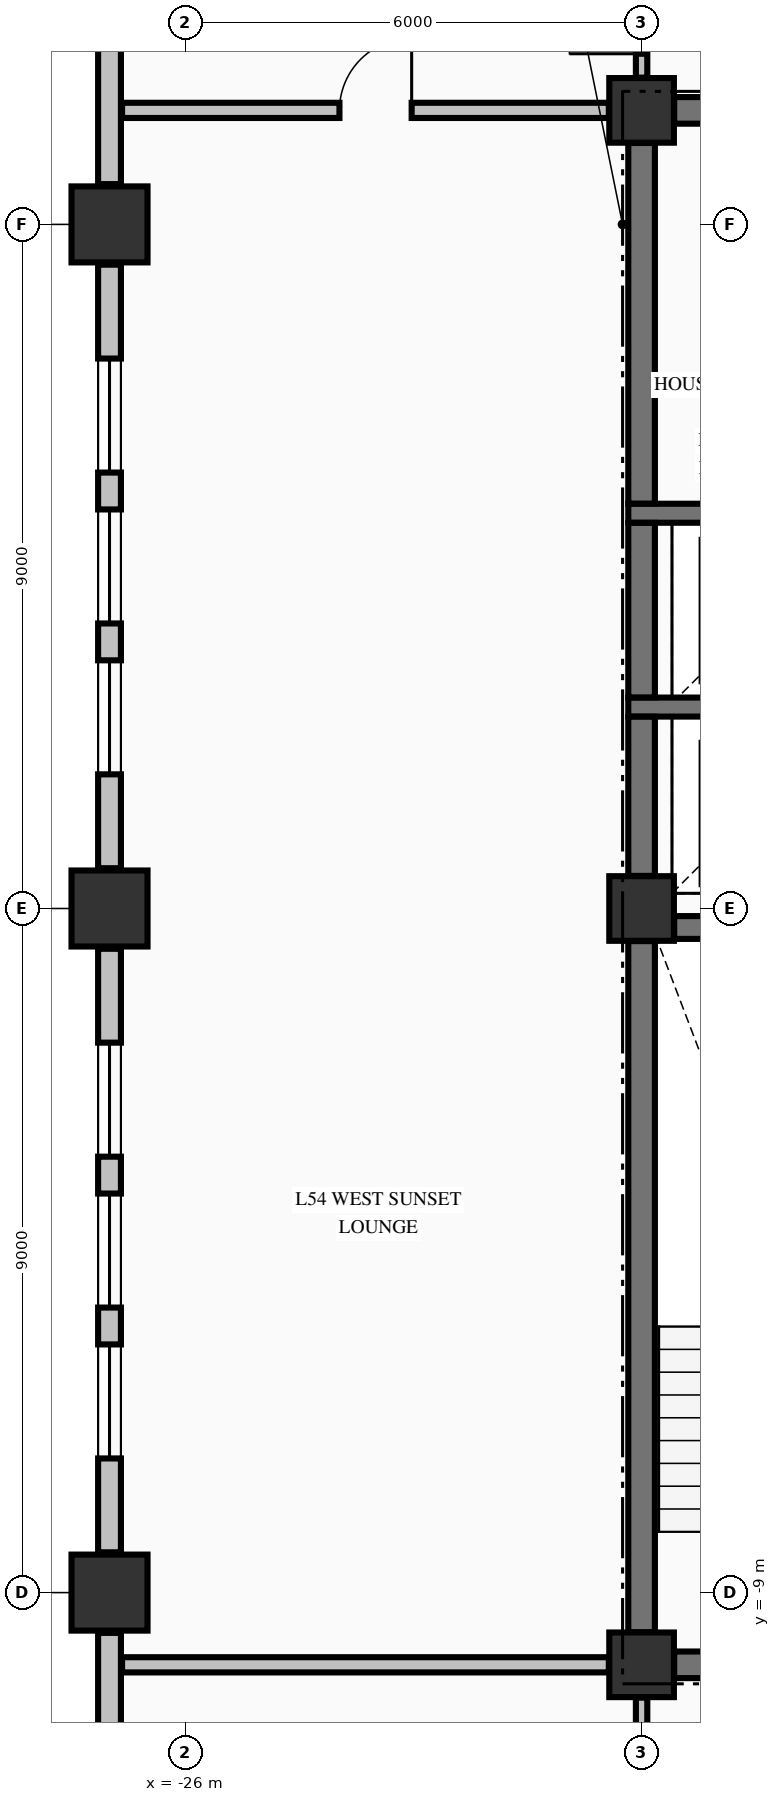
"""IFC4 building model, lengths in metres.
Left out: names, types, materials, properties, quantities, classifications, styles, units other than length and angle.
Written with IfcOpenShell. Run it as: python <this file> out.ifc"""

import sys

from ifc_helpers import new_model, si_unit, direction, frame, frame_2d, origin, origin_2d, place, context, subcontext, project, spatial, rectangle, extrude, element, fill, save


model = new_model("IFC4")
c1 = context("Model", 3, precision=1e-05, world=origin(), true_north=direction((0.0, 1.0)))
c2 = subcontext(c1, "Body", "Model", "MODEL_VIEW")
j1 = project(units=[si_unit("LENGTHUNIT", "METRE"), si_unit("PLANEANGLEUNIT", "RADIAN")], contexts=[c1])
p1 = place(None, origin())
s1 = spatial("IfcSite", under=j1, at=p1, CompositionType="ELEMENT")
p2 = place(p1, origin())
s2 = spatial("IfcBuilding", under=s1, at=p2, CompositionType="ELEMENT")
p3 = place(p2, frame((0.0, 0.0, 208.46)))
s3 = spatial("IfcBuildingStorey", under=s2, at=p3, CompositionType="ELEMENT", Elevation=208.46)
for number, where, z_axis, x_axis in (
    (1, (-27.0, -9.0, -0.25), (0.0, 0.0, 1.0), (1.0, 0.0, 0.0)),
    (2, (-27.0, 0.0, -0.25), (0.0, 0.0, 1.0), (1.0, 0.0, 0.0)),
    (3, (-27.0, 9.0, -0.25), (0.0, 0.0, 1.0), (1.0, 0.0, 0.0)),
):
    element("IfcColumn", number, at=place(p3, frame(where, z_axis=z_axis, x_axis=x_axis)), inside=s3, PredefinedType="COLUMN", context=c2, shape_type="SweptSolid", body=[
        extrude(rectangle(XDim=1.0, YDim=1.0, at=origin_2d()), origin(), (0.0, 0.0, 1.0), 3.325),
    ])
for number, where, z_axis, x_axis in (
    (4, (-20.0, -9.95, -0.25), (0.0, 0.0, 1.0), (1.0, 0.0, 0.0)),
    (5, (-20.0, 10.5, -0.25), (0.0, 0.0, 1.0), (1.0, 0.0, 0.0)),
    (6, (-20.0, 0.0, -0.25), (0.0, 0.0, 1.0), (1.0, 0.0, 0.0)),
):
    element("IfcColumn", number, at=place(p3, frame(where, z_axis=z_axis, x_axis=x_axis)), inside=s3, PredefinedType="COLUMN", context=c2, shape_type="SweptSolid", body=[
        extrude(rectangle(XDim=0.85, YDim=0.85, at=origin_2d()), origin(), (0.0, 0.0, 1.0), 3.325),
    ])
p4 = place(p3, frame((-27.0, -9.53, 0.0), z_axis=(0.0, 0.0, 1.0), x_axis=(0.0, -1.0, 0.0)))
e7 = element("IfcWall", 7, at=p4, inside=s3, PredefinedType="STANDARD", context=c2, shape_type="SweptSolid", body=[
    extrude(rectangle(XDim=9.44, YDim=0.3, at=frame_2d((4.72, 0.0))), origin(), (0.0, 0.0, 1.0), 2.467),
])
p5 = place(p3, frame((-27.0, -0.53, 0.0), z_axis=(0.0, 0.0, 1.0), x_axis=(0.0, -1.0, 0.0)))
e8 = element("IfcWall", 8, at=p5, inside=s3, PredefinedType="STANDARD", context=c2, shape_type="SweptSolid", body=[
    extrude(rectangle(XDim=7.94, YDim=0.3, at=frame_2d((3.97, 0.0))), origin(), (0.0, 0.0, 1.0), 2.467),
])
p6 = place(p5, frame((1.235, 0.0, 0.72)))
e9 = element("IfcOpeningElement", 9, at=p6, cuts=e8, PredefinedType="OPENING", context=c2, shape_type="SweptSolid", body=[
    extrude(rectangle(XDim=1.5, YDim=1.6, at=frame_2d((0.75, 0.8))), frame((0.0, 0.16, 0.0), z_axis=(0.0, -1.0, 0.0), x_axis=(1.0, 0.0, 0.0)), (0.0, 0.0, 1.0), 0.32),
])
p7 = place(p5, frame((3.22, 0.0, 0.72)))
e10 = element("IfcOpeningElement", 10, at=p7, cuts=e8, PredefinedType="OPENING", context=c2, shape_type="SweptSolid", body=[
    extrude(rectangle(XDim=1.5, YDim=1.6, at=frame_2d((0.75, 0.8))), frame((0.0, 0.16, 0.0), z_axis=(0.0, -1.0, 0.0), x_axis=(1.0, 0.0, 0.0)), (0.0, 0.0, 1.0), 0.32),
])
p8 = place(p5, frame((5.205, 0.0, 0.72)))
e11 = element("IfcOpeningElement", 11, at=p8, cuts=e8, PredefinedType="OPENING", context=c2, shape_type="SweptSolid", body=[
    extrude(rectangle(XDim=1.5, YDim=1.6, at=frame_2d((0.75, 0.8))), frame((0.0, 0.16, 0.0), z_axis=(0.0, -1.0, 0.0), x_axis=(1.0, 0.0, 0.0)), (0.0, 0.0, 1.0), 0.32),
])
p9 = place(p3, frame((-27.0, 8.47, 0.0), z_axis=(0.0, 0.0, 1.0), x_axis=(0.0, -1.0, 0.0)))
e12 = element("IfcWall", 12, at=p9, inside=s3, PredefinedType="STANDARD", context=c2, shape_type="SweptSolid", body=[
    extrude(rectangle(XDim=7.94, YDim=0.3, at=frame_2d((3.97, 0.0))), origin(), (0.0, 0.0, 1.0), 2.467),
])
p10 = place(p9, frame((1.235, 0.0, 0.72)))
e13 = element("IfcOpeningElement", 13, at=p10, cuts=e12, PredefinedType="OPENING", context=c2, shape_type="SweptSolid", body=[
    extrude(rectangle(XDim=1.5, YDim=1.6, at=frame_2d((0.75, 0.8))), frame((0.0, 0.16, 0.0), z_axis=(0.0, -1.0, 0.0), x_axis=(1.0, 0.0, 0.0)), (0.0, 0.0, 1.0), 0.32),
])
p11 = place(p9, frame((3.22, 0.0, 0.72)))
e14 = element("IfcOpeningElement", 14, at=p11, cuts=e12, PredefinedType="OPENING", context=c2, shape_type="SweptSolid", body=[
    extrude(rectangle(XDim=1.5, YDim=1.6, at=frame_2d((0.75, 0.8))), frame((0.0, 0.16, 0.0), z_axis=(0.0, -1.0, 0.0), x_axis=(1.0, 0.0, 0.0)), (0.0, 0.0, 1.0), 0.32),
])
p12 = place(p9, frame((5.205, 0.0, 0.72)))
e15 = element("IfcOpeningElement", 15, at=p12, cuts=e12, PredefinedType="OPENING", context=c2, shape_type="SweptSolid", body=[
    extrude(rectangle(XDim=1.5, YDim=1.6, at=frame_2d((0.75, 0.8))), frame((0.0, 0.16, 0.0), z_axis=(0.0, -1.0, 0.0), x_axis=(1.0, 0.0, 0.0)), (0.0, 0.0, 1.0), 0.32),
])
p13 = place(p3, frame((-27.0, 18.97, 0.0), z_axis=(0.0, 0.0, 1.0), x_axis=(0.0, -1.0, 0.0)))
e16 = element("IfcWall", 16, at=p13, inside=s3, PredefinedType="STANDARD", context=c2, shape_type="SweptSolid", body=[
    extrude(rectangle(XDim=9.44, YDim=0.3, at=frame_2d((4.72, 0.0))), origin(), (0.0, 0.0, 1.0), 2.467),
])
p14 = place(p3, frame((-19.571, -9.95, 0.0), z_axis=(0.0, 0.0, 1.0), x_axis=(1.0, 0.0, 0.0)))
e17 = element("IfcWall", 17, at=p14, inside=s3, PredefinedType="SHEAR", context=c2, shape_type="SweptSolid", body=[
    extrude(rectangle(XDim=4.871, YDim=0.35, at=frame_2d((2.436, 0.0))), origin(), (0.0, 0.0, 1.0), 3.075),
])
p15 = place(p14, frame((0.746, 0.0, 0.0)))
e18 = element("IfcOpeningElement", 18, at=p15, cuts=e17, PredefinedType="OPENING", context=c2, shape_type="SweptSolid", body=[
    extrude(rectangle(XDim=1.05, YDim=2.15, at=frame_2d((0.525, 1.075))), frame((0.0, 0.185, 0.0), z_axis=(0.0, -1.0, 0.0), x_axis=(1.0, 0.0, 0.0)), (0.0, 0.0, 1.0), 0.37),
])
p16 = place(p3, frame((-19.571, -0.25, 0.0), z_axis=(0.0, 0.0, 1.0), x_axis=(1.0, 0.0, 0.0)))
e19 = element("IfcWall", 19, at=p16, inside=s3, PredefinedType="SHEAR", context=c2, shape_type="SweptSolid", body=[
    extrude(rectangle(XDim=8.142, YDim=0.3, at=frame_2d((4.071, 0.0))), origin(), (0.0, 0.0, 1.0), 3.075),
])
p17 = place(p16, frame((5.871, 0.0, 0.0)))
e20 = element("IfcOpeningElement", 20, at=p17, cuts=e19, PredefinedType="OPENING", context=c2, shape_type="SweptSolid", body=[
    extrude(rectangle(XDim=1.1, YDim=2.15, at=frame_2d((0.55, 1.075))), frame((0.0, 0.16, 0.0), z_axis=(0.0, -1.0, 0.0), x_axis=(1.0, 0.0, 0.0)), (0.0, 0.0, 1.0), 0.32),
])
for number, where, z_axis, x_axis in (
    (21, (-20.175, 2.65, 0.0), (0.0, 0.0, 1.0), (1.0, 0.0, 0.0)),
    (22, (-20.175, 5.2, 0.0), (0.0, 0.0, 1.0), (1.0, 0.0, 0.0)),
):
    element("IfcWall", number, at=place(p3, frame(where, z_axis=z_axis, x_axis=x_axis)), inside=s3, PredefinedType="SOLIDWALL", context=c2, shape_type="SweptSolid", body=[
        extrude(rectangle(XDim=3.2, YDim=0.25, at=frame_2d((1.6, 0.0))), origin(), (0.0, 0.0, 1.0), 3.075),
    ])
p18 = place(p3, frame((-19.571, 10.5, 0.0), z_axis=(0.0, 0.0, 1.0), x_axis=(1.0, 0.0, 0.0)))
e23 = element("IfcWall", 23, at=p18, inside=s3, PredefinedType="SHEAR", context=c2, shape_type="SweptSolid", body=[
    extrude(rectangle(XDim=4.871, YDim=0.35, at=frame_2d((2.436, 0.0))), origin(), (0.0, 0.0, 1.0), 3.075),
])
p19 = place(p18, frame((3.121, 0.0, 0.0)))
e24 = element("IfcOpeningElement", 24, at=p19, cuts=e23, PredefinedType="OPENING", context=c2, shape_type="SweptSolid", body=[
    extrude(rectangle(XDim=1.1, YDim=2.15, at=frame_2d((0.55, 1.075))), frame((0.0, 0.185, 0.0), z_axis=(0.0, -1.0, 0.0), x_axis=(1.0, 0.0, 0.0)), (0.0, 0.0, 1.0), 0.37),
])
p20 = place(p3, frame((-26.835, -9.95, 0.0), z_axis=(0.0, 0.0, 1.0), x_axis=(1.0, 0.0, 0.0)))
e25 = element("IfcWall", 25, at=p20, inside=s3, PredefinedType="PARTITIONING", context=c2, shape_type="SweptSolid", body=[
    extrude(rectangle(XDim=6.404, YDim=0.2, at=frame_2d((3.202, 0.0))), origin(), (0.0, 0.0, 1.0), 3.075),
])
p21 = place(p3, frame((-26.835, 10.5, 0.0), z_axis=(0.0, 0.0, 1.0), x_axis=(1.0, 0.0, 0.0)))
e26 = element("IfcWall", 26, at=p21, inside=s3, PredefinedType="PARTITIONING", context=c2, shape_type="SweptSolid", body=[
    extrude(rectangle(XDim=6.404, YDim=0.2, at=frame_2d((3.202, 0.0))), origin(), (0.0, 0.0, 1.0), 3.075),
])
p22 = place(p21, frame((2.86, 0.0, 0.0)))
e27 = element("IfcOpeningElement", 27, at=p22, cuts=e26, PredefinedType="OPENING", context=c2, shape_type="SweptSolid", body=[
    extrude(rectangle(XDim=0.95, YDim=2.15, at=frame_2d((0.475, 1.075))), frame((0.0, 0.11, 0.0), z_axis=(0.0, -1.0, 0.0), x_axis=(1.0, 0.0, 0.0)), (0.0, 0.0, 1.0), 0.22),
])
p23 = place(p3, frame((-20.0, -9.521, 0.0), z_axis=(0.0, 0.0, 1.0), x_axis=(0.0, 1.0, 0.0)))
e28 = element("IfcWall", 28, at=p23, inside=s3, PredefinedType="SHEAR", context=c2, shape_type="SweptSolid", body=[
    extrude(rectangle(XDim=9.092, YDim=0.35, at=frame_2d((4.546, 0.0))), origin(), (0.0, 0.0, 1.0), 3.075),
])
p24 = place(p3, frame((-20.0, 0.429, 0.0), z_axis=(0.0, 0.0, 1.0), x_axis=(0.0, 1.0, 0.0)))
e29 = element("IfcWall", 29, at=p24, inside=s3, PredefinedType="SHEAR", context=c2, shape_type="SweptSolid", body=[
    extrude(rectangle(XDim=2.094, YDim=0.35, at=frame_2d((1.047, 0.0))), origin(), (0.0, 0.0, 1.0), 3.075),
])
p25 = place(p3, frame((-20.0, 2.777, 0.0), z_axis=(0.0, 0.0, 1.0), x_axis=(0.0, 1.0, 0.0)))
e30 = element("IfcWall", 30, at=p25, inside=s3, PredefinedType="SHEAR", context=c2, shape_type="SweptSolid", body=[
    extrude(rectangle(XDim=2.296, YDim=0.35, at=frame_2d((1.148, 0.0))), origin(), (0.0, 0.0, 1.0), 3.075),
])
p26 = place(p3, frame((-20.0, 5.327, 0.0), z_axis=(0.0, 0.0, 1.0), x_axis=(0.0, 1.0, 0.0)))
e31 = element("IfcWall", 31, at=p26, inside=s3, PredefinedType="SHEAR", context=c2, shape_type="SweptSolid", body=[
    extrude(rectangle(XDim=4.744, YDim=0.35, at=frame_2d((2.372, 0.0))), origin(), (0.0, 0.0, 1.0), 3.075),
])
p27 = place(p3, frame((-20.0, -12.997, 0.0), z_axis=(0.0, 0.0, 1.0), x_axis=(0.0, 1.0, 0.0)))
e32 = element("IfcWall", 32, at=p27, inside=s3, PredefinedType="PARTITIONING", context=c2, shape_type="SweptSolid", body=[
    extrude(rectangle(XDim=2.616, YDim=0.15, at=frame_2d((1.308, 0.0))), origin(), (0.0, 0.0, 1.0), 2.267),
])
p28 = place(p3, frame((-20.0, 10.931, 0.0), z_axis=(0.0, 0.0, 1.0), x_axis=(0.0, 1.0, 0.0)))
e33 = element("IfcWall", 33, at=p28, inside=s3, PredefinedType="PARTITIONING", context=c2, shape_type="SweptSolid", body=[
    extrude(rectangle(XDim=1.916, YDim=0.15, at=frame_2d((0.958, 0.0))), origin(), (0.0, 0.0, 1.0), 2.267),
])
p29 = place(p28, frame((0.314, 0.0, 0.0)))
e34 = element("IfcOpeningElement", 34, at=p29, cuts=e33, PredefinedType="OPENING", context=c2, shape_type="SweptSolid", body=[
    extrude(rectangle(XDim=0.95, YDim=2.15, at=frame_2d((0.475, 1.075))), frame((0.0, 0.085, 0.0), z_axis=(0.0, -1.0, 0.0), x_axis=(1.0, 0.0, 0.0)), (0.0, 0.0, 1.0), 0.17),
])
p30 = place(p6, origin())
e35 = element("IfcWindow", 35, at=p30, inside=s3, PartitioningType="SINGLE_PANEL", PredefinedType="WINDOW", context=c2, shape_type="SweptSolid", body=[
    extrude(rectangle(XDim=1.5, YDim=1.6, at=frame_2d((0.75, 0.8))), frame((0.0, 0.03, 0.0), z_axis=(0.0, -1.0, 0.0), x_axis=(1.0, 0.0, 0.0)), (0.0, 0.0, 1.0), 0.06),
])
fill(e9, e35)
p31 = place(p7, origin())
e36 = element("IfcWindow", 36, at=p31, inside=s3, PartitioningType="SINGLE_PANEL", PredefinedType="WINDOW", context=c2, shape_type="SweptSolid", body=[
    extrude(rectangle(XDim=1.5, YDim=1.6, at=frame_2d((0.75, 0.8))), frame((0.0, 0.03, 0.0), z_axis=(0.0, -1.0, 0.0), x_axis=(1.0, 0.0, 0.0)), (0.0, 0.0, 1.0), 0.06),
])
fill(e10, e36)
p32 = place(p8, origin())
e37 = element("IfcWindow", 37, at=p32, inside=s3, PartitioningType="SINGLE_PANEL", PredefinedType="WINDOW", context=c2, shape_type="SweptSolid", body=[
    extrude(rectangle(XDim=1.5, YDim=1.6, at=frame_2d((0.75, 0.8))), frame((0.0, 0.03, 0.0), z_axis=(0.0, -1.0, 0.0), x_axis=(1.0, 0.0, 0.0)), (0.0, 0.0, 1.0), 0.06),
])
fill(e11, e37)
p33 = place(p10, origin())
e38 = element("IfcWindow", 38, at=p33, inside=s3, PartitioningType="SINGLE_PANEL", PredefinedType="WINDOW", context=c2, shape_type="SweptSolid", body=[
    extrude(rectangle(XDim=1.5, YDim=1.6, at=frame_2d((0.75, 0.8))), frame((0.0, 0.03, 0.0), z_axis=(0.0, -1.0, 0.0), x_axis=(1.0, 0.0, 0.0)), (0.0, 0.0, 1.0), 0.06),
])
fill(e13, e38)
p34 = place(p11, origin())
e39 = element("IfcWindow", 39, at=p34, inside=s3, PartitioningType="SINGLE_PANEL", PredefinedType="WINDOW", context=c2, shape_type="SweptSolid", body=[
    extrude(rectangle(XDim=1.5, YDim=1.6, at=frame_2d((0.75, 0.8))), frame((0.0, 0.03, 0.0), z_axis=(0.0, -1.0, 0.0), x_axis=(1.0, 0.0, 0.0)), (0.0, 0.0, 1.0), 0.06),
])
fill(e14, e39)
p35 = place(p12, origin())
e40 = element("IfcWindow", 40, at=p35, inside=s3, PartitioningType="SINGLE_PANEL", PredefinedType="WINDOW", context=c2, shape_type="SweptSolid", body=[
    extrude(rectangle(XDim=1.5, YDim=1.6, at=frame_2d((0.75, 0.8))), frame((0.0, 0.03, 0.0), z_axis=(0.0, -1.0, 0.0), x_axis=(1.0, 0.0, 0.0)), (0.0, 0.0, 1.0), 0.06),
])
fill(e15, e40)
p36 = place(p29, origin())
e41 = element("IfcDoor", 41, at=p36, inside=s3, OperationType="SINGLE_SWING_LEFT", PredefinedType="DOOR", context=c2, shape_type="SweptSolid", body=[
    extrude(rectangle(XDim=0.95, YDim=2.15, at=frame_2d((0.475, 1.075))), frame((0.0, 0.025, 0.0), z_axis=(0.0, -1.0, 0.0), x_axis=(1.0, 0.0, 0.0)), (0.0, 0.0, 1.0), 0.05),
])
fill(e34, e41)
p37 = place(p22, origin())
e42 = element("IfcDoor", 42, at=p37, inside=s3, OperationType="SINGLE_SWING_RIGHT", PredefinedType="DOOR", context=c2, shape_type="SweptSolid", body=[
    extrude(rectangle(XDim=0.95, YDim=2.15, at=frame_2d((0.475, 1.075))), frame((0.0, 0.025, 0.0), z_axis=(0.0, -1.0, 0.0), x_axis=(1.0, 0.0, 0.0)), (0.0, 0.0, 1.0), 0.05),
])
fill(e27, e42)
save(model, sys.argv[1])
